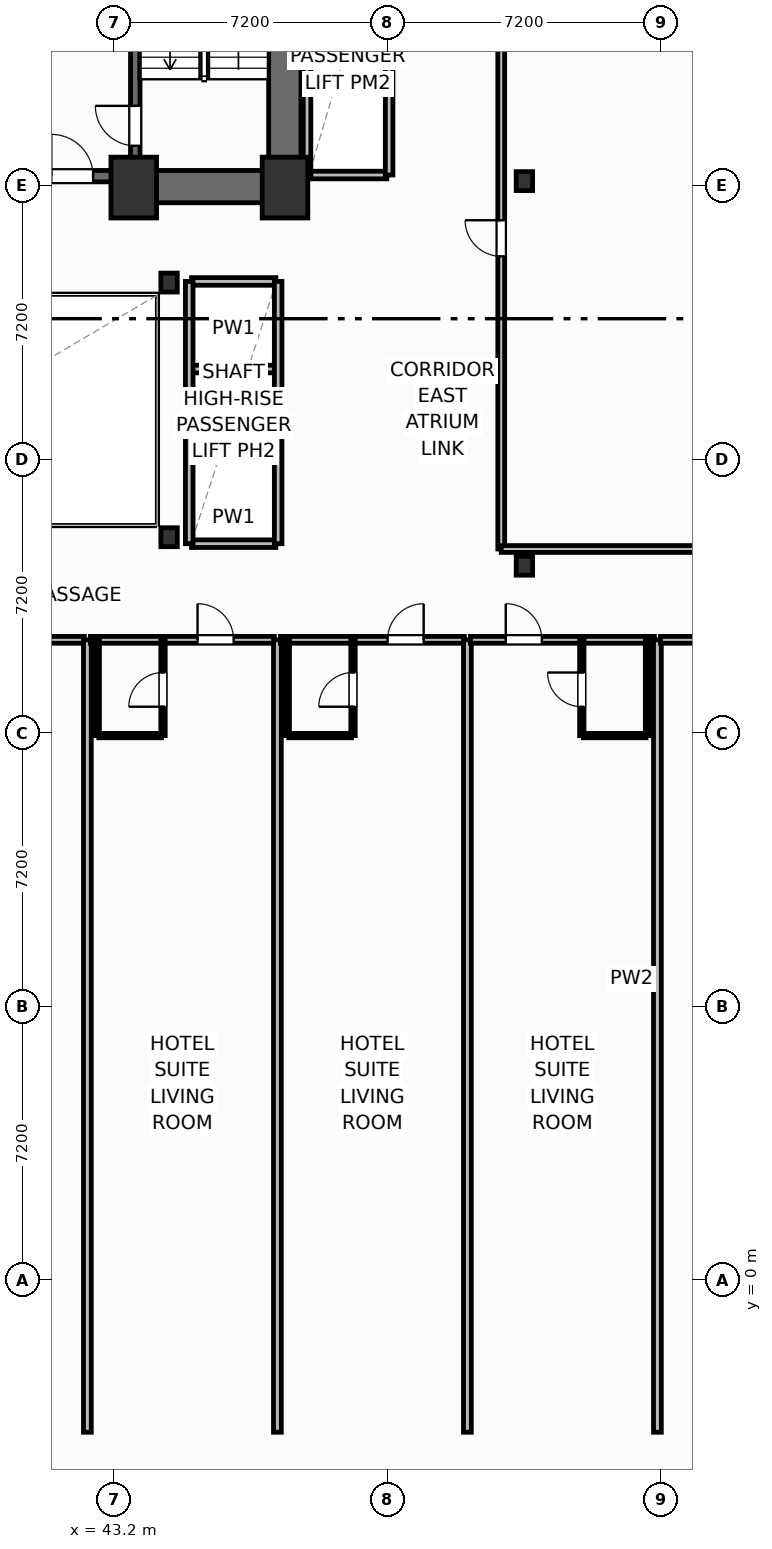
"""IFC4 building model, lengths in metres.
Left out: names, types, materials, properties, quantities, classifications, styles, units other than length and angle.
Written with IfcOpenShell. Run it as: python <this file> out.ifc"""

import sys

from ifc_helpers import new_model, si_unit, direction, frame, frame_2d, origin, origin_2d, place, context, subcontext, project, spatial, rectangle, i_section, extrude, element, fill, save


model = new_model("IFC4")
c1 = context("Model", 3, precision=1e-05, world=origin(), true_north=direction((0.0, 1.0)))
c2 = subcontext(c1, "Body", "Model", "MODEL_VIEW")
j1 = project(units=[si_unit("LENGTHUNIT", "METRE"), si_unit("PLANEANGLEUNIT", "RADIAN")], contexts=[c1])
p1 = place(None, origin())
s1 = spatial("IfcSite", under=j1, at=p1, CompositionType="ELEMENT")
p2 = place(p1, origin())
s2 = spatial("IfcBuilding", under=s1, at=p2, CompositionType="ELEMENT")
p3 = place(p2, frame((0.0, 0.0, 34.4)))
s3 = spatial("IfcBuildingStorey", under=s2, at=p3, CompositionType="ELEMENT", Elevation=34.4)
for number, where, z_axis, x_axis in (
    (1, (43.72, 28.75, 0.0), (0.0, 0.0, 1.0), (1.0, 0.0, 0.0)),
    (2, (47.7, 28.75, 0.0), (0.0, 0.0, 1.0), (1.0, 0.0, 0.0)),
):
    element("IfcColumn", number, at=place(p3, frame(where, z_axis=z_axis, x_axis=x_axis)), inside=s3, PredefinedType="COLUMN", context=c2, shape_type="SweptSolid", body=[
        extrude(rectangle(XDim=1.2, YDim=1.6, at=origin_2d()), origin(), (0.0, 0.0, 1.0), 3.7),
    ])
for number, where, z_axis, x_axis in (
    (3, (44.65, 19.55, 0.0), (0.0, 0.0, 1.0), (1.0, 0.0, 0.0)),
    (4, (44.65, 26.25, 0.0), (0.0, 0.0, 1.0), (1.0, 0.0, 0.0)),
    (5, (54.0, 18.8, 0.0), (0.0, 0.0, 1.0), (1.0, 0.0, 0.0)),
    (6, (54.0, 28.92, 0.0), (0.0, 0.0, 1.0), (1.0, 0.0, 0.0)),
):
    element("IfcColumn", number, at=place(p3, frame(where, z_axis=z_axis, x_axis=x_axis)), inside=s3, PredefinedType="COLUMN", context=c2, shape_type="SweptSolid", body=[
        extrude(i_section(OverallWidth=0.432, OverallDepth=0.498, WebThickness=0.056, FlangeThickness=0.089, FilletRadius=0.025, at=origin_2d()), origin(), (0.0, 0.0, 1.0), 3.7),
    ])
p4 = place(p3, frame((47.695, 29.2, 0.0), z_axis=(0.0, 0.0, 1.0), x_axis=(0.0, 1.0, 0.0)))
e7 = element("IfcWall", 7, at=p4, inside=s3, PredefinedType="SHEAR", context=c2, shape_type="SweptSolid", body=[
    extrude(rectangle(XDim=9.22, YDim=0.85, at=frame_2d((4.61, 0.0))), origin(), (0.0, 0.0, 1.0), 3.45),
])
p5 = place(p3, frame((43.6, 28.775, 0.0), z_axis=(0.0, 0.0, 1.0), x_axis=(1.0, 0.0, 0.0)))
e8 = element("IfcWall", 8, at=p5, inside=s3, PredefinedType="SHEAR", context=c2, shape_type="SweptSolid", body=[
    extrude(rectangle(XDim=4.52, YDim=0.85, at=frame_2d((2.26, 0.0))), origin(), (0.0, 0.0, 1.0), 3.45),
])
p6 = place(p3, frame((34.8, 29.05, 0.0), z_axis=(0.0, 0.0, 1.0), x_axis=(1.0, 0.0, 0.0)))
e9 = element("IfcWall", 9, at=p6, inside=s3, PredefinedType="SHEAR", context=c2, shape_type="SweptSolid", body=[
    extrude(rectangle(XDim=8.8, YDim=0.3, at=frame_2d((4.4, 0.0))), origin(), (0.0, 0.0, 1.0), 3.45),
])
p7 = place(p6, frame((0.95, 0.0, 0.0)))
e10 = element("IfcOpeningElement", 10, at=p7, cuts=e9, PredefinedType="OPENING", context=c2, shape_type="SweptSolid", body=[
    extrude(rectangle(XDim=1.1, YDim=2.15, at=frame_2d((0.55, 1.075))), frame((0.0, 0.16, 0.0), z_axis=(0.0, -1.0, 0.0), x_axis=(1.0, 0.0, 0.0)), (0.0, 0.0, 1.0), 0.32),
])
p8 = place(p6, frame((6.75, 0.0, 0.0)))
e11 = element("IfcOpeningElement", 11, at=p8, cuts=e9, PredefinedType="OPENING", context=c2, shape_type="SweptSolid", body=[
    extrude(rectangle(XDim=1.1, YDim=2.15, at=frame_2d((0.55, 1.075))), frame((0.0, 0.16, 0.0), z_axis=(0.0, -1.0, 0.0), x_axis=(1.0, 0.0, 0.0)), (0.0, 0.0, 1.0), 0.32),
])
p9 = place(p6, frame((4.45, 0.0, 0.0)))
e12 = element("IfcOpeningElement", 12, at=p9, cuts=e9, PredefinedType="OPENING", context=c2, shape_type="SweptSolid", body=[
    extrude(rectangle(XDim=0.95, YDim=2.15, at=frame_2d((0.475, 1.075))), frame((0.0, 0.16, 0.0), z_axis=(0.0, -1.0, 0.0), x_axis=(1.0, 0.0, 0.0)), (0.0, 0.0, 1.0), 0.32),
])
p10 = place(p3, frame((43.76, 29.2, 0.0), z_axis=(0.0, 0.0, 1.0), x_axis=(0.0, 1.0, 0.0)))
e13 = element("IfcWall", 13, at=p10, inside=s3, PredefinedType="SHEAR", context=c2, shape_type="SweptSolid", body=[
    extrude(rectangle(XDim=9.22, YDim=0.25, at=frame_2d((4.61, 0.0))), origin(), (0.0, 0.0, 1.0), 3.45),
])
p11 = place(p10, frame((0.65, 0.0, 0.0)))
e14 = element("IfcOpeningElement", 14, at=p11, cuts=e13, PredefinedType="OPENING", context=c2, shape_type="SweptSolid", body=[
    extrude(rectangle(XDim=1.05, YDim=2.15, at=frame_2d((0.525, 1.075))), frame((0.0, 0.135, 0.0), z_axis=(0.0, -1.0, 0.0), x_axis=(1.0, 0.0, 0.0)), (0.0, 0.0, 1.0), 0.27),
])
p12 = place(p3, frame((33.518, -1.362, 0.0), z_axis=(0.0, 0.0, 1.0), x_axis=(0.82353935489, -0.567259139148, 0.0)))
e15 = element("IfcWall", 15, at=p12, inside=s3, PredefinedType="SOLIDWALL", context=c2, shape_type="SweptSolid", body=[
    extrude(rectangle(XDim=23.147, YDim=0.22, at=frame_2d((11.573, 0.0))), origin(), (0.0, 0.0, 1.0), 2.73),
])
p13 = place(p12, frame((10.749, 0.0, 0.8)))
e16 = element("IfcOpeningElement", 16, at=p13, cuts=e15, PredefinedType="OPENING", context=c2, shape_type="SweptSolid", body=[
    extrude(rectangle(XDim=1.65, YDim=1.65, at=frame_2d((0.825, 0.825))), frame((0.0, 0.12, 0.0), z_axis=(0.0, -1.0, 0.0), x_axis=(1.0, 0.0, 0.0)), (0.0, 0.0, 1.0), 0.24),
])
p14 = place(p3, frame((37.58, 16.85, 0.0), z_axis=(0.0, 0.0, 1.0), x_axis=(1.0, 0.0, 0.0)))
e17 = element("IfcWall", 17, at=p14, inside=s3, PredefinedType="PARTITIONING", context=c2, shape_type="SweptSolid", body=[
    extrude(rectangle(XDim=4.84, YDim=0.18, at=frame_2d((2.42, 0.0))), origin(), (0.0, 0.0, 1.0), 3.45),
])
p15 = place(p14, frame((2.819, 0.0, 0.0)))
e18 = element("IfcOpeningElement", 18, at=p15, cuts=e17, PredefinedType="OPENING", context=c2, shape_type="SweptSolid", body=[
    extrude(rectangle(XDim=0.95, YDim=2.15, at=frame_2d((0.475, 1.075))), frame((0.0, 0.1, 0.0), z_axis=(0.0, -1.0, 0.0), x_axis=(1.0, 0.0, 0.0)), (0.0, 0.0, 1.0), 0.2),
])
p16 = place(p3, frame((42.5, -4.0, 0.0), z_axis=(0.0, 0.0, 1.0), x_axis=(0.0, 1.0, 0.0)))
e19 = element("IfcWall", 19, at=p16, inside=s3, PredefinedType="PARTITIONING", context=c2, shape_type="SweptSolid", body=[
    extrude(rectangle(XDim=20.85, YDim=0.205, at=frame_2d((10.425, 0.0))), origin(), (0.0, 0.0, 1.0), 2.58),
])
p17 = place(p3, frame((42.58, 16.85, 0.0), z_axis=(0.0, 0.0, 1.0), x_axis=(1.0, 0.0, 0.0)))
e20 = element("IfcWall", 20, at=p17, inside=s3, PredefinedType="PARTITIONING", context=c2, shape_type="SweptSolid", body=[
    extrude(rectangle(XDim=4.84, YDim=0.18, at=frame_2d((2.42, 0.0))), origin(), (0.0, 0.0, 1.0), 3.45),
])
p18 = place(p17, frame((2.819, 0.0, 0.0)))
e21 = element("IfcOpeningElement", 21, at=p18, cuts=e20, PredefinedType="OPENING", context=c2, shape_type="SweptSolid", body=[
    extrude(rectangle(XDim=0.95, YDim=2.15, at=frame_2d((0.475, 1.075))), frame((0.0, 0.1, 0.0), z_axis=(0.0, -1.0, 0.0), x_axis=(1.0, 0.0, 0.0)), (0.0, 0.0, 1.0), 0.2),
])
p19 = place(p3, frame((42.8, 14.33, 0.0), z_axis=(0.0, 0.0, 1.0), x_axis=(1.0, 0.0, 0.0)))
e22 = element("IfcWall", 22, at=p19, inside=s3, PredefinedType="PARTITIONING", context=c2, shape_type="SweptSolid", body=[
    extrude(rectangle(XDim=1.65, YDim=0.115, at=frame_2d((0.825, 0.0))), origin(), (0.0, 0.0, 1.0), 3.45),
])
p20 = place(p3, frame((44.49, 14.33, 0.0), z_axis=(0.0, 0.0, 1.0), x_axis=(0.0, 1.0, 0.0)))
e23 = element("IfcWall", 23, at=p20, inside=s3, PredefinedType="PARTITIONING", context=c2, shape_type="SweptSolid", body=[
    extrude(rectangle(XDim=2.52, YDim=0.115, at=frame_2d((1.26, 0.0))), origin(), (0.0, 0.0, 1.0), 3.45),
])
p21 = place(p20, frame((0.76, 0.0, 0.0)))
e24 = element("IfcOpeningElement", 24, at=p21, cuts=e23, PredefinedType="OPENING", context=c2, shape_type="SweptSolid", body=[
    extrude(rectangle(XDim=0.9, YDim=2.05, at=frame_2d((0.45, 1.025))), frame((0.0, 0.067, 0.0), z_axis=(0.0, -1.0, 0.0), x_axis=(1.0, 0.0, 0.0)), (0.0, 0.0, 1.0), 0.135),
])
p22 = place(p3, frame((42.76, 14.33, 0.0), z_axis=(0.0, 0.0, 1.0), x_axis=(0.0, 1.0, 0.0)))
e25 = element("IfcWall", 25, at=p22, inside=s3, PredefinedType="PARTITIONING", context=c2, shape_type="SweptSolid", body=[
    extrude(rectangle(XDim=2.52, YDim=0.115, at=frame_2d((1.26, 0.0))), origin(), (0.0, 0.0, 1.0), 3.45),
])
p23 = place(p3, frame((47.5, -4.0, 0.0), z_axis=(0.0, 0.0, 1.0), x_axis=(0.0, 1.0, 0.0)))
e26 = element("IfcWall", 26, at=p23, inside=s3, PredefinedType="PARTITIONING", context=c2, shape_type="SweptSolid", body=[
    extrude(rectangle(XDim=20.85, YDim=0.205, at=frame_2d((10.425, 0.0))), origin(), (0.0, 0.0, 1.0), 3.45),
])
p24 = place(p3, frame((47.58, 16.85, 0.0), z_axis=(0.0, 0.0, 1.0), x_axis=(1.0, 0.0, 0.0)))
e27 = element("IfcWall", 27, at=p24, inside=s3, PredefinedType="PARTITIONING", context=c2, shape_type="SweptSolid", body=[
    extrude(rectangle(XDim=4.84, YDim=0.18, at=frame_2d((2.42, 0.0))), origin(), (0.0, 0.0, 1.0), 3.45),
])
p25 = place(p24, frame((2.819, 0.0, 0.0)))
e28 = element("IfcOpeningElement", 28, at=p25, cuts=e27, PredefinedType="OPENING", context=c2, shape_type="SweptSolid", body=[
    extrude(rectangle(XDim=0.95, YDim=2.15, at=frame_2d((0.475, 1.075))), frame((0.0, 0.1, 0.0), z_axis=(0.0, -1.0, 0.0), x_axis=(1.0, 0.0, 0.0)), (0.0, 0.0, 1.0), 0.2),
])
p26 = place(p3, frame((47.8, 14.33, 0.0), z_axis=(0.0, 0.0, 1.0), x_axis=(1.0, 0.0, 0.0)))
e29 = element("IfcWall", 29, at=p26, inside=s3, PredefinedType="PARTITIONING", context=c2, shape_type="SweptSolid", body=[
    extrude(rectangle(XDim=1.65, YDim=0.115, at=frame_2d((0.825, 0.0))), origin(), (0.0, 0.0, 1.0), 3.45),
])
p27 = place(p3, frame((49.49, 14.33, 0.0), z_axis=(0.0, 0.0, 1.0), x_axis=(0.0, 1.0, 0.0)))
e30 = element("IfcWall", 30, at=p27, inside=s3, PredefinedType="PARTITIONING", context=c2, shape_type="SweptSolid", body=[
    extrude(rectangle(XDim=2.52, YDim=0.115, at=frame_2d((1.26, 0.0))), origin(), (0.0, 0.0, 1.0), 3.45),
])
p28 = place(p27, frame((0.76, 0.0, 0.0)))
e31 = element("IfcOpeningElement", 31, at=p28, cuts=e30, PredefinedType="OPENING", context=c2, shape_type="SweptSolid", body=[
    extrude(rectangle(XDim=0.9, YDim=2.05, at=frame_2d((0.45, 1.025))), frame((0.0, 0.067, 0.0), z_axis=(0.0, -1.0, 0.0), x_axis=(1.0, 0.0, 0.0)), (0.0, 0.0, 1.0), 0.135),
])
p29 = place(p3, frame((47.76, 14.33, 0.0), z_axis=(0.0, 0.0, 1.0), x_axis=(0.0, 1.0, 0.0)))
e32 = element("IfcWall", 32, at=p29, inside=s3, PredefinedType="PARTITIONING", context=c2, shape_type="SweptSolid", body=[
    extrude(rectangle(XDim=2.52, YDim=0.115, at=frame_2d((1.26, 0.0))), origin(), (0.0, 0.0, 1.0), 3.45),
])
p30 = place(p3, frame((52.5, -4.0, 0.0), z_axis=(0.0, 0.0, 1.0), x_axis=(0.0, 1.0, 0.0)))
e33 = element("IfcWall", 33, at=p30, inside=s3, PredefinedType="PARTITIONING", context=c2, shape_type="SweptSolid", body=[
    extrude(rectangle(XDim=20.85, YDim=0.205, at=frame_2d((10.425, 0.0))), origin(), (0.0, 0.0, 1.0), 3.45),
])
p31 = place(p3, frame((52.58, 16.85, 0.0), z_axis=(0.0, 0.0, 1.0), x_axis=(1.0, 0.0, 0.0)))
e34 = element("IfcWall", 34, at=p31, inside=s3, PredefinedType="PARTITIONING", context=c2, shape_type="SweptSolid", body=[
    extrude(rectangle(XDim=4.84, YDim=0.18, at=frame_2d((2.42, 0.0))), origin(), (0.0, 0.0, 1.0), 3.45),
])
p32 = place(p31, frame((0.929, 0.0, 0.0)))
e35 = element("IfcOpeningElement", 35, at=p32, cuts=e34, PredefinedType="OPENING", context=c2, shape_type="SweptSolid", body=[
    extrude(rectangle(XDim=0.95, YDim=2.15, at=frame_2d((0.475, 1.075))), frame((0.0, 0.1, 0.0), z_axis=(0.0, -1.0, 0.0), x_axis=(1.0, 0.0, 0.0)), (0.0, 0.0, 1.0), 0.2),
])
p33 = place(p3, frame((55.55, 14.33, 0.0), z_axis=(0.0, 0.0, 1.0), x_axis=(1.0, 0.0, 0.0)))
e36 = element("IfcWall", 36, at=p33, inside=s3, PredefinedType="PARTITIONING", context=c2, shape_type="SweptSolid", body=[
    extrude(rectangle(XDim=1.65, YDim=0.115, at=frame_2d((0.825, 0.0))), origin(), (0.0, 0.0, 1.0), 3.45),
])
p34 = place(p3, frame((55.51, 14.33, 0.0), z_axis=(0.0, 0.0, 1.0), x_axis=(0.0, 1.0, 0.0)))
e37 = element("IfcWall", 37, at=p34, inside=s3, PredefinedType="PARTITIONING", context=c2, shape_type="SweptSolid", body=[
    extrude(rectangle(XDim=2.52, YDim=0.115, at=frame_2d((1.26, 0.0))), origin(), (0.0, 0.0, 1.0), 3.45),
])
p35 = place(p34, frame((0.76, 0.0, 0.0)))
e38 = element("IfcOpeningElement", 38, at=p35, cuts=e37, PredefinedType="OPENING", context=c2, shape_type="SweptSolid", body=[
    extrude(rectangle(XDim=0.9, YDim=2.05, at=frame_2d((0.45, 1.025))), frame((0.0, 0.067, 0.0), z_axis=(0.0, -1.0, 0.0), x_axis=(1.0, 0.0, 0.0)), (0.0, 0.0, 1.0), 0.135),
])
p36 = place(p3, frame((57.24, 14.33, 0.0), z_axis=(0.0, 0.0, 1.0), x_axis=(0.0, 1.0, 0.0)))
e39 = element("IfcWall", 39, at=p36, inside=s3, PredefinedType="PARTITIONING", context=c2, shape_type="SweptSolid", body=[
    extrude(rectangle(XDim=2.52, YDim=0.115, at=frame_2d((1.26, 0.0))), origin(), (0.0, 0.0, 1.0), 3.45),
])
p37 = place(p3, frame((57.5, -4.0, 0.0), z_axis=(0.0, 0.0, 1.0), x_axis=(0.0, 1.0, 0.0)))
e40 = element("IfcWall", 40, at=p37, inside=s3, PredefinedType="PARTITIONING", context=c2, shape_type="SweptSolid", body=[
    extrude(rectangle(XDim=20.85, YDim=0.205, at=frame_2d((10.425, 0.0))), origin(), (0.0, 0.0, 1.0), 3.45),
])
p38 = place(p3, frame((57.58, 16.85, 0.0), z_axis=(0.0, 0.0, 1.0), x_axis=(1.0, 0.0, 0.0)))
e41 = element("IfcWall", 41, at=p38, inside=s3, PredefinedType="PARTITIONING", context=c2, shape_type="SweptSolid", body=[
    extrude(rectangle(XDim=4.84, YDim=0.18, at=frame_2d((2.42, 0.0))), origin(), (0.0, 0.0, 1.0), 2.58),
])
p39 = place(p38, frame((0.929, 0.0, 0.0)))
e42 = element("IfcOpeningElement", 42, at=p39, cuts=e41, PredefinedType="OPENING", context=c2, shape_type="SweptSolid", body=[
    extrude(rectangle(XDim=0.95, YDim=2.15, at=frame_2d((0.475, 1.075))), frame((0.0, 0.1, 0.0), z_axis=(0.0, -1.0, 0.0), x_axis=(1.0, 0.0, 0.0)), (0.0, 0.0, 1.0), 0.2),
])
p40 = place(p3, frame((53.39, 19.24, 0.0), z_axis=(0.0, 0.0, 1.0), x_axis=(0.0, 1.0, 0.0)))
e43 = element("IfcWall", 43, at=p40, inside=s3, PredefinedType="PARTITIONING", context=c2, shape_type="SweptSolid", body=[
    extrude(rectangle(XDim=20.06, YDim=0.18, at=frame_2d((10.03, 0.0))), origin(), (0.0, 0.0, 1.0), 3.45),
])
p41 = place(p40, frame((7.7, 0.0, 0.0)))
e44 = element("IfcOpeningElement", 44, at=p41, cuts=e43, PredefinedType="OPENING", context=c2, shape_type="SweptSolid", body=[
    extrude(rectangle(XDim=0.95, YDim=2.05, at=frame_2d((0.475, 1.025))), frame((0.0, 0.1, 0.0), z_axis=(0.0, -1.0, 0.0), x_axis=(1.0, 0.0, 0.0)), (0.0, 0.0, 1.0), 0.2),
])
p42 = place(p3, frame((53.39, 19.24, 0.0), z_axis=(0.0, 0.0, 1.0), x_axis=(1.0, 0.0, 0.0)))
e45 = element("IfcWall", 45, at=p42, inside=s3, PredefinedType="PARTITIONING", context=c2, shape_type="SweptSolid", body=[
    extrude(rectangle(XDim=23.61, YDim=0.18, at=frame_2d((11.805, 0.0))), origin(), (0.0, 0.0, 1.0), 3.45),
])
p43 = place(p3, frame((48.32, 31.375, 0.0), z_axis=(0.0, 0.0, 1.0), x_axis=(1.0, 0.0, 0.0)))
e46 = element("IfcWall", 46, at=p43, inside=s3, PredefinedType="PARTITIONING", context=c2, shape_type="SweptSolid", body=[
    extrude(rectangle(XDim=2.06, YDim=0.2, at=frame_2d((1.03, 0.0))), origin(), (0.0, 0.0, 1.0), 3.45),
])
p44 = place(p3, frame((48.32, 29.08, 0.0), z_axis=(0.0, 0.0, 1.0), x_axis=(1.0, 0.0, 0.0)))
e47 = element("IfcWall", 47, at=p44, inside=s3, PredefinedType="PARTITIONING", context=c2, shape_type="SweptSolid", body=[
    extrude(rectangle(XDim=2.06, YDim=0.2, at=frame_2d((1.03, 0.0))), origin(), (0.0, 0.0, 1.0), 2.662),
])
for number, where, z_axis, x_axis in (
    (48, (48.28, 29.08, 0.0), (0.0, 0.0, 1.0), (0.0, 1.0, 0.0)),
    (49, (50.44, 29.08, 0.0), (0.0, 0.0, 1.0), (0.0, 1.0, 0.0)),
):
    element("IfcWall", number, at=place(p3, frame(where, z_axis=z_axis, x_axis=x_axis)), inside=s3, PredefinedType="PARTITIONING", context=c2, shape_type="SweptSolid", body=[
        extrude(rectangle(XDim=6.89, YDim=0.2, at=frame_2d((3.445, 0.0))), origin(), (0.0, 0.0, 1.0), 3.45),
    ])
for number, where, z_axis, x_axis in (
    (50, (45.24, 21.675, 0.0), (0.0, 0.0, 1.0), (1.0, 0.0, 0.0)),
    (51, (45.24, 23.975, 0.0), (0.0, 0.0, 1.0), (1.0, 0.0, 0.0)),
):
    element("IfcWall", number, at=place(p3, frame(where, z_axis=z_axis, x_axis=x_axis)), inside=s3, PredefinedType="PARTITIONING", context=c2, shape_type="SweptSolid", body=[
        extrude(rectangle(XDim=2.22, YDim=0.2, at=frame_2d((1.11, 0.0))), origin(), (0.0, 0.0, 1.0), 3.45),
    ])
p45 = place(p3, frame((45.24, 19.38, 0.0), z_axis=(0.0, 0.0, 1.0), x_axis=(1.0, 0.0, 0.0)))
e52 = element("IfcWall", 52, at=p45, inside=s3, PredefinedType="PARTITIONING", context=c2, shape_type="SweptSolid", body=[
    extrude(rectangle(XDim=2.22, YDim=0.2, at=frame_2d((1.11, 0.0))), origin(), (0.0, 0.0, 1.0), 2.662),
])
p46 = place(p3, frame((45.24, 26.28, 0.0), z_axis=(0.0, 0.0, 1.0), x_axis=(1.0, 0.0, 0.0)))
e53 = element("IfcWall", 53, at=p46, inside=s3, PredefinedType="PARTITIONING", context=c2, shape_type="SweptSolid", body=[
    extrude(rectangle(XDim=2.22, YDim=0.2, at=frame_2d((1.11, 0.0))), origin(), (0.0, 0.0, 1.0), 3.45),
])
for number, where, z_axis, x_axis in (
    (54, (45.18, 19.38, 0.0), (0.0, 0.0, 1.0), (0.0, 1.0, 0.0)),
    (55, (47.52, 19.38, 0.0), (0.0, 0.0, 1.0), (0.0, 1.0, 0.0)),
):
    element("IfcWall", number, at=place(p3, frame(where, z_axis=z_axis, x_axis=x_axis)), inside=s3, PredefinedType="PARTITIONING", context=c2, shape_type="SweptSolid", body=[
        extrude(rectangle(XDim=6.9, YDim=0.2, at=frame_2d((3.45, 0.0))), origin(), (0.0, 0.0, 1.0), 3.45),
    ])
p47 = place(p18, origin())
e56 = element("IfcDoor", 56, at=p47, inside=s3, OperationType="SINGLE_SWING_LEFT", PredefinedType="DOOR", context=c2, shape_type="SweptSolid", body=[
    extrude(rectangle(XDim=0.95, YDim=2.15, at=frame_2d((0.475, 1.075))), frame((0.0, 0.025, 0.0), z_axis=(0.0, -1.0, 0.0), x_axis=(1.0, 0.0, 0.0)), (0.0, 0.0, 1.0), 0.05),
])
fill(e21, e56)
p48 = place(p21, origin())
e57 = element("IfcDoor", 57, at=p48, inside=s3, OperationType="SINGLE_SWING_LEFT", PredefinedType="DOOR", context=c2, shape_type="SweptSolid", body=[
    extrude(rectangle(XDim=0.9, YDim=2.05, at=frame_2d((0.45, 1.025))), frame((0.0, 0.025, 0.0), z_axis=(0.0, -1.0, 0.0), x_axis=(1.0, 0.0, 0.0)), (0.0, 0.0, 1.0), 0.05),
])
fill(e24, e57)
p49 = place(p25, origin())
e58 = element("IfcDoor", 58, at=p49, inside=s3, OperationType="SINGLE_SWING_RIGHT", PredefinedType="DOOR", context=c2, shape_type="SweptSolid", body=[
    extrude(rectangle(XDim=0.95, YDim=2.15, at=frame_2d((0.475, 1.075))), frame((0.0, 0.025, 0.0), z_axis=(0.0, -1.0, 0.0), x_axis=(1.0, 0.0, 0.0)), (0.0, 0.0, 1.0), 0.05),
])
fill(e28, e58)
p50 = place(p28, origin())
e59 = element("IfcDoor", 59, at=p50, inside=s3, OperationType="SINGLE_SWING_LEFT", PredefinedType="DOOR", context=c2, shape_type="SweptSolid", body=[
    extrude(rectangle(XDim=0.9, YDim=2.05, at=frame_2d((0.45, 1.025))), frame((0.0, 0.025, 0.0), z_axis=(0.0, -1.0, 0.0), x_axis=(1.0, 0.0, 0.0)), (0.0, 0.0, 1.0), 0.05),
])
fill(e31, e59)
p51 = place(p32, origin())
e60 = element("IfcDoor", 60, at=p51, inside=s3, OperationType="SINGLE_SWING_LEFT", PredefinedType="DOOR", context=c2, shape_type="SweptSolid", body=[
    extrude(rectangle(XDim=0.95, YDim=2.15, at=frame_2d((0.475, 1.075))), frame((0.0, 0.025, 0.0), z_axis=(0.0, -1.0, 0.0), x_axis=(1.0, 0.0, 0.0)), (0.0, 0.0, 1.0), 0.05),
])
fill(e35, e60)
p52 = place(p35, origin())
e61 = element("IfcDoor", 61, at=p52, inside=s3, OperationType="SINGLE_SWING_RIGHT", PredefinedType="DOOR", context=c2, shape_type="SweptSolid", body=[
    extrude(rectangle(XDim=0.9, YDim=2.05, at=frame_2d((0.45, 1.025))), frame((0.0, 0.025, 0.0), z_axis=(0.0, -1.0, 0.0), x_axis=(1.0, 0.0, 0.0)), (0.0, 0.0, 1.0), 0.05),
])
fill(e38, e61)
p53 = place(p41, origin())
e62 = element("IfcDoor", 62, at=p53, inside=s3, OperationType="SINGLE_SWING_RIGHT", PredefinedType="DOOR", context=c2, shape_type="SweptSolid", body=[
    extrude(rectangle(XDim=0.95, YDim=2.05, at=frame_2d((0.475, 1.025))), frame((0.0, 0.025, 0.0), z_axis=(0.0, -1.0, 0.0), x_axis=(1.0, 0.0, 0.0)), (0.0, 0.0, 1.0), 0.05),
])
fill(e44, e62)
p54 = place(p11, origin())
e63 = element("IfcDoor", 63, at=p54, inside=s3, OperationType="SINGLE_SWING_RIGHT", PredefinedType="DOOR", context=c2, shape_type="SweptSolid", body=[
    extrude(rectangle(XDim=1.05, YDim=2.15, at=frame_2d((0.525, 1.075))), frame((0.0, 0.025, 0.0), z_axis=(0.0, -1.0, 0.0), x_axis=(1.0, 0.0, 0.0)), (0.0, 0.0, 1.0), 0.05),
])
fill(e14, e63)
p55 = place(p8, origin())
e64 = element("IfcDoor", 64, at=p55, inside=s3, OperationType="SINGLE_SWING_LEFT", PredefinedType="DOOR", context=c2, shape_type="SweptSolid", body=[
    extrude(rectangle(XDim=1.1, YDim=2.15, at=frame_2d((0.55, 1.075))), frame((0.0, 0.025, 0.0), z_axis=(0.0, -1.0, 0.0), x_axis=(1.0, 0.0, 0.0)), (0.0, 0.0, 1.0), 0.05),
])
fill(e11, e64)
save(model, sys.argv[1])
